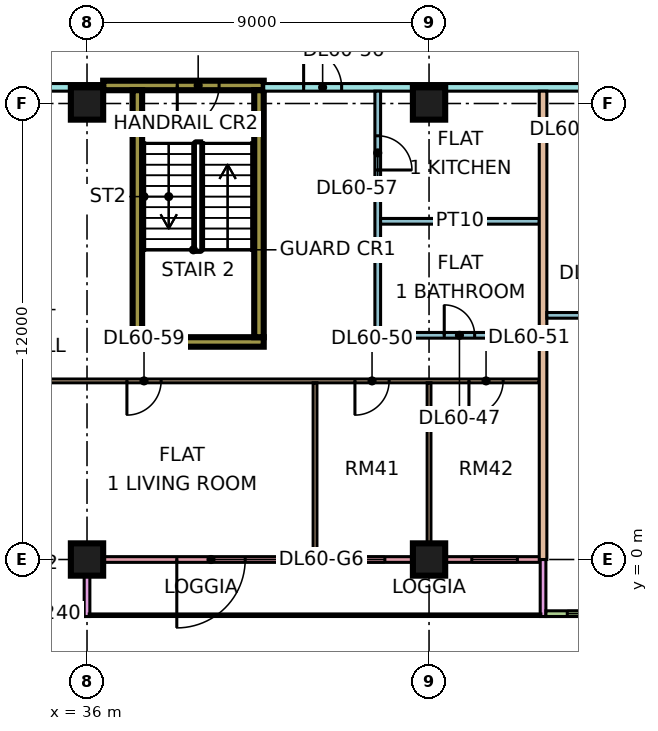
"""IFC4 building model, lengths in metres.
Left out: names, types, materials, properties, quantities, classifications, styles, units other than length and angle.
Written with IfcOpenShell. Run it as: python <this file> out.ifc"""

import sys

from ifc_helpers import new_model, si_unit, direction, frame, frame_2d, origin, origin_2d, place, context, subcontext, project, spatial, rectangle, extrude, element, fill, save


model = new_model("IFC4")
c1 = context("Model", 3, precision=1e-05, world=origin(), true_north=direction((0.0, 1.0)))
c2 = subcontext(c1, "Body", "Model", "MODEL_VIEW")
j1 = project(units=[si_unit("LENGTHUNIT", "METRE"), si_unit("PLANEANGLEUNIT", "RADIAN")], contexts=[c1])
p1 = place(None, origin())
s1 = spatial("IfcSite", under=j1, at=p1, CompositionType="ELEMENT")
p2 = place(p1, origin())
s2 = spatial("IfcBuilding", under=s1, at=p2, CompositionType="ELEMENT")
p3 = place(p2, frame((0.0, 0.0, 252.9)))
s3 = spatial("IfcBuildingStorey", under=s2, at=p3, CompositionType="ELEMENT", Elevation=252.9)
for number, where, z_axis, x_axis in (
    (1, (36.0, 0.0, 0.0), (0.0, 0.0, 1.0), (1.0, 0.0, 0.0)),
    (2, (36.0, 12.0, 0.0), (0.0, 0.0, 1.0), (1.0, 0.0, 0.0)),
    (3, (45.0, 0.0, 0.0), (0.0, 0.0, 1.0), (1.0, 0.0, 0.0)),
    (4, (45.0, 12.0, 0.0), (0.0, 0.0, 1.0), (1.0, 0.0, 0.0)),
):
    element("IfcColumn", number, at=place(p3, frame(where, z_axis=z_axis, x_axis=x_axis)), inside=s3, PredefinedType="COLUMN", context=c2, shape_type="SweptSolid", body=[
        extrude(rectangle(XDim=0.85, YDim=0.85, at=origin_2d()), origin(), (0.0, 0.0, 1.0), 3.75),
    ])
p4 = place(p3, frame((37.2, 5.725, 0.0), z_axis=(0.0, 0.0, 1.0), x_axis=(1.0, 0.0, 0.0)))
e5 = element("IfcWall", 5, at=p4, inside=s3, PredefinedType="SHEAR", context=c2, shape_type="SweptSolid", body=[
    extrude(rectangle(XDim=3.45, YDim=0.25, at=frame_2d((1.725, 0.0))), origin(), (0.0, 0.0, 1.0), 3.75),
])
p5 = place(p3, frame((36.425, 12.475, 0.0), z_axis=(0.0, 0.0, 1.0), x_axis=(1.0, 0.0, 0.0)))
e6 = element("IfcWall", 6, at=p5, inside=s3, PredefinedType="SHEAR", context=c2, shape_type="SweptSolid", body=[
    extrude(rectangle(XDim=4.225, YDim=0.25, at=frame_2d((2.112, 0.0))), origin(), (0.0, 0.0, 1.0), 3.75),
])
p6 = place(p5, frame((1.95, 0.0, 0.0)))
e7 = element("IfcOpeningElement", 7, at=p6, cuts=e6, PredefinedType="OPENING", context=c2, shape_type="SweptSolid", body=[
    extrude(rectangle(XDim=1.1, YDim=2.2, at=frame_2d((0.55, 1.1))), frame((0.0, 0.135, 0.0), z_axis=(0.0, -1.0, 0.0), x_axis=(1.0, 0.0, 0.0)), (0.0, 0.0, 1.0), 0.27),
])
for number, where, z_axis, x_axis in (
    (8, (37.325, 5.85, 0.0), (0.0, 0.0, 1.0), (0.0, 1.0, 0.0)),
    (9, (40.525, 5.85, 0.0), (0.0, 0.0, 1.0), (0.0, 1.0, 0.0)),
):
    element("IfcWall", number, at=place(p3, frame(where, z_axis=z_axis, x_axis=x_axis)), inside=s3, PredefinedType="SHEAR", context=c2, shape_type="SweptSolid", body=[
        extrude(rectangle(XDim=6.5, YDim=0.25, at=frame_2d((3.25, 0.0))), origin(), (0.0, 0.0, 1.0), 3.75),
    ])
p7 = place(p3, frame((24.075, -1.425, 0.0), z_axis=(0.0, 0.0, 1.0), x_axis=(1.0, 0.0, 0.0)))
e10 = element("IfcWall", 10, at=p7, inside=s3, PredefinedType="SOLIDWALL", context=c2, shape_type="SweptSolid", body=[
    extrude(rectangle(XDim=11.85, YDim=0.15, at=frame_2d((5.925, 0.0))), origin(), (0.0, 0.0, 1.0), 3.3),
])
p8 = place(p7, frame((1.462, 0.0, 0.45)))
e11 = element("IfcOpeningElement", 11, at=p8, cuts=e10, PredefinedType="OPENING", context=c2, shape_type="SweptSolid", body=[
    extrude(rectangle(XDim=3.0, YDim=2.4, at=frame_2d((1.5, 1.2))), frame((0.0, 0.085, 0.0), z_axis=(0.0, -1.0, 0.0), x_axis=(1.0, 0.0, 0.0)), (0.0, 0.0, 1.0), 0.17),
])
p9 = place(p7, frame((6.525, 0.0, 0.45)))
e12 = element("IfcOpeningElement", 12, at=p9, cuts=e10, PredefinedType="OPENING", context=c2, shape_type="SweptSolid", body=[
    extrude(rectangle(XDim=1.8, YDim=2.4, at=frame_2d((0.9, 1.2))), frame((0.0, 0.085, 0.0), z_axis=(0.0, -1.0, 0.0), x_axis=(1.0, 0.0, 0.0)), (0.0, 0.0, 1.0), 0.17),
])
p10 = place(p7, frame((9.488, 0.0, 0.45)))
e13 = element("IfcOpeningElement", 13, at=p10, cuts=e10, PredefinedType="OPENING", context=c2, shape_type="SweptSolid", body=[
    extrude(rectangle(XDim=1.8, YDim=2.4, at=frame_2d((0.9, 1.2))), frame((0.0, 0.085, 0.0), z_axis=(0.0, -1.0, 0.0), x_axis=(1.0, 0.0, 0.0)), (0.0, 0.0, 1.0), 0.17),
])
p11 = place(p3, frame((36.075, 0.0, 0.0), z_axis=(0.0, 0.0, 1.0), x_axis=(1.0, 0.0, 0.0)))
e14 = element("IfcWall", 14, at=p11, inside=s3, PredefinedType="SOLIDWALL", context=c2, shape_type="SweptSolid", body=[
    extrude(rectangle(XDim=11.85, YDim=0.15, at=frame_2d((5.925, 0.0))), origin(), (0.0, 0.0, 1.0), 3.3),
])
p12 = place(p11, frame((2.288, 0.0, 0.0)))
e15 = element("IfcOpeningElement", 15, at=p12, cuts=e14, PredefinedType="OPENING", context=c2, shape_type="SweptSolid", body=[
    extrude(rectangle(XDim=1.8, YDim=2.4, at=frame_2d((0.9, 1.2))), frame((0.0, 0.085, 0.0), z_axis=(0.0, -1.0, 0.0), x_axis=(1.0, 0.0, 0.0)), (0.0, 0.0, 1.0), 0.17),
])
p13 = place(p11, frame((6.562, 0.0, 0.45)))
e16 = element("IfcOpeningElement", 16, at=p13, cuts=e14, PredefinedType="OPENING", context=c2, shape_type="SweptSolid", body=[
    extrude(rectangle(XDim=1.2, YDim=2.4, at=frame_2d((0.6, 1.2))), frame((0.0, 0.085, 0.0), z_axis=(0.0, -1.0, 0.0), x_axis=(1.0, 0.0, 0.0)), (0.0, 0.0, 1.0), 0.17),
])
p14 = place(p11, frame((10.05, 0.0, 0.45)))
e17 = element("IfcOpeningElement", 17, at=p14, cuts=e14, PredefinedType="OPENING", context=c2, shape_type="SweptSolid", body=[
    extrude(rectangle(XDim=1.2, YDim=2.4, at=frame_2d((0.6, 1.2))), frame((0.0, 0.085, 0.0), z_axis=(0.0, -1.0, 0.0), x_axis=(1.0, 0.0, 0.0)), (0.0, 0.0, 1.0), 0.17),
])
for number, where, z_axis, x_axis in (
    (18, (36.0, -1.5, 0.0), (0.0, 0.0, 1.0), (0.0, 1.0, 0.0)),
    (19, (48.0, -1.5, 0.0), (0.0, 0.0, 1.0), (0.0, 1.0, 0.0)),
):
    element("IfcWall", number, at=place(p3, frame(where, z_axis=z_axis, x_axis=x_axis)), inside=s3, PredefinedType="SOLIDWALL", context=c2, shape_type="SweptSolid", body=[
        extrude(rectangle(XDim=1.5, YDim=0.15, at=frame_2d((0.75, 0.0))), origin(), (0.0, 0.0, 1.0), 3.3),
    ])
p15 = place(p3, frame((48.075, -1.425, 0.0), z_axis=(0.0, 0.0, 1.0), x_axis=(1.0, 0.0, 0.0)))
e20 = element("IfcWall", 20, at=p15, inside=s3, PredefinedType="SOLIDWALL", context=c2, shape_type="SweptSolid", body=[
    extrude(rectangle(XDim=13.425, YDim=0.15, at=frame_2d((6.712, 0.0))), origin(), (0.0, 0.0, 1.0), 3.3),
])
p16 = place(p15, frame((0.562, 0.0, 0.45)))
e21 = element("IfcOpeningElement", 21, at=p16, cuts=e20, PredefinedType="OPENING", context=c2, shape_type="SweptSolid", body=[
    extrude(rectangle(XDim=1.8, YDim=2.4, at=frame_2d((0.9, 1.2))), frame((0.0, 0.085, 0.0), z_axis=(0.0, -1.0, 0.0), x_axis=(1.0, 0.0, 0.0)), (0.0, 0.0, 1.0), 0.17),
])
p17 = place(p15, frame((4.425, 0.0, 0.45)))
e22 = element("IfcOpeningElement", 22, at=p17, cuts=e20, PredefinedType="OPENING", context=c2, shape_type="SweptSolid", body=[
    extrude(rectangle(XDim=3.0, YDim=2.4, at=frame_2d((1.5, 1.2))), frame((0.0, 0.085, 0.0), z_axis=(0.0, -1.0, 0.0), x_axis=(1.0, 0.0, 0.0)), (0.0, 0.0, 1.0), 0.17),
])
p18 = place(p15, frame((9.375, 0.0, 0.45)))
e23 = element("IfcOpeningElement", 23, at=p18, cuts=e20, PredefinedType="OPENING", context=c2, shape_type="SweptSolid", body=[
    extrude(rectangle(XDim=3.6, YDim=2.4, at=frame_2d((1.8, 1.2))), frame((0.0, 0.085, 0.0), z_axis=(0.0, -1.0, 0.0), x_axis=(1.0, 0.0, 0.0)), (0.0, 0.0, 1.0), 0.17),
])
p19 = place(p3, frame((33.05, 4.7, 0.0), z_axis=(0.0, 0.0, 1.0), x_axis=(1.0, 0.0, 0.0)))
e24 = element("IfcWall", 24, at=p19, inside=s3, PredefinedType="PARTITIONING", context=c2, shape_type="SweptSolid", body=[
    extrude(rectangle(XDim=14.85, YDim=0.1, at=frame_2d((7.425, 0.0))), origin(), (0.0, 0.0, 1.0), 3.3),
])
p20 = place(p19, frame((10.0, 0.0, 0.0)))
e25 = element("IfcOpeningElement", 25, at=p20, cuts=e24, PredefinedType="OPENING", context=c2, shape_type="SweptSolid", body=[
    extrude(rectangle(XDim=0.9, YDim=2.1, at=frame_2d((0.45, 1.05))), frame((0.0, 0.06, 0.0), z_axis=(0.0, -1.0, 0.0), x_axis=(1.0, 0.0, 0.0)), (0.0, 0.0, 1.0), 0.12),
])
p21 = place(p19, frame((13.0, 0.0, 0.0)))
e26 = element("IfcOpeningElement", 26, at=p21, cuts=e24, PredefinedType="OPENING", context=c2, shape_type="SweptSolid", body=[
    extrude(rectangle(XDim=0.9, YDim=2.1, at=frame_2d((0.45, 1.05))), frame((0.0, 0.06, 0.0), z_axis=(0.0, -1.0, 0.0), x_axis=(1.0, 0.0, 0.0)), (0.0, 0.0, 1.0), 0.12),
])
p22 = place(p19, frame((4.0, 0.0, 0.0)))
e27 = element("IfcOpeningElement", 27, at=p22, cuts=e24, PredefinedType="OPENING", context=c2, shape_type="SweptSolid", body=[
    extrude(rectangle(XDim=0.9, YDim=2.1, at=frame_2d((0.45, 1.05))), frame((0.0, 0.06, 0.0), z_axis=(0.0, -1.0, 0.0), x_axis=(1.0, 0.0, 0.0)), (0.0, 0.0, 1.0), 0.12),
])
p23 = place(p3, frame((34.0, 12.425, 0.0), z_axis=(0.0, 0.0, 1.0), x_axis=(1.0, 0.0, 0.0)))
e28 = element("IfcWall", 28, at=p23, inside=s3, PredefinedType="PARTITIONING", context=c2, shape_type="SweptSolid", body=[
    extrude(rectangle(XDim=2.426, YDim=0.2, at=frame_2d((1.213, 0.0))), origin(), (0.0, 0.0, 1.0), 3.3),
])
p24 = place(p3, frame((40.65, 12.425, 0.0), z_axis=(0.0, 0.0, 1.0), x_axis=(1.0, 0.0, 0.0)))
e29 = element("IfcWall", 29, at=p24, inside=s3, PredefinedType="PARTITIONING", context=c2, shape_type="SweptSolid", body=[
    extrude(rectangle(XDim=22.276, YDim=0.2, at=frame_2d((11.138, 0.0))), origin(), (0.0, 0.0, 1.0), 3.3),
])
p25 = place(p24, frame((8.7, 0.0, 0.0)))
e30 = element("IfcOpeningElement", 30, at=p25, cuts=e29, PredefinedType="OPENING", context=c2, shape_type="SweptSolid", body=[
    extrude(rectangle(XDim=1.0, YDim=2.1, at=frame_2d((0.5, 1.05))), frame((0.0, 0.11, 0.0), z_axis=(0.0, -1.0, 0.0), x_axis=(1.0, 0.0, 0.0)), (0.0, 0.0, 1.0), 0.22),
])
p26 = place(p24, frame((1.05, 0.0, 0.0)))
e31 = element("IfcOpeningElement", 31, at=p26, cuts=e29, PredefinedType="OPENING", context=c2, shape_type="SweptSolid", body=[
    extrude(rectangle(XDim=1.0, YDim=2.1, at=frame_2d((0.5, 1.05))), frame((0.0, 0.11, 0.0), z_axis=(0.0, -1.0, 0.0), x_axis=(1.0, 0.0, 0.0)), (0.0, 0.0, 1.0), 0.22),
])
p27 = place(p3, frame((42.0, 0.074, 0.0), z_axis=(0.0, 0.0, 1.0), x_axis=(0.0, 1.0, 0.0)))
e32 = element("IfcWall", 32, at=p27, inside=s3, PredefinedType="PARTITIONING", context=c2, shape_type="SweptSolid", body=[
    extrude(rectangle(XDim=4.576, YDim=0.1, at=frame_2d((2.288, 0.0))), origin(), (0.0, 0.0, 1.0), 3.3),
])
p28 = place(p3, frame((43.65, 5.825, 0.0), z_axis=(0.0, 0.0, 1.0), x_axis=(0.0, 1.0, 0.0)))
e33 = element("IfcWall", 33, at=p28, inside=s3, PredefinedType="PARTITIONING", context=c2, shape_type="SweptSolid", body=[
    extrude(rectangle(XDim=6.5, YDim=0.15, at=frame_2d((3.25, 0.0))), origin(), (0.0, 0.0, 1.0), 3.3),
])
p29 = place(p28, frame((4.425, 0.0, 0.0)))
e34 = element("IfcOpeningElement", 34, at=p29, cuts=e33, PredefinedType="OPENING", context=c2, shape_type="SweptSolid", body=[
    extrude(rectangle(XDim=0.9, YDim=2.1, at=frame_2d((0.45, 1.05))), frame((0.0, 0.085, 0.0), z_axis=(0.0, -1.0, 0.0), x_axis=(1.0, 0.0, 0.0)), (0.0, 0.0, 1.0), 0.17),
])
p30 = place(p3, frame((43.725, 5.9, 0.0), z_axis=(0.0, 0.0, 1.0), x_axis=(1.0, 0.0, 0.0)))
e35 = element("IfcWall", 35, at=p30, inside=s3, PredefinedType="PARTITIONING", context=c2, shape_type="SweptSolid", body=[
    extrude(rectangle(XDim=4.175, YDim=0.15, at=frame_2d((2.087, 0.0))), origin(), (0.0, 0.0, 1.0), 3.3),
])
p31 = place(p30, frame((1.675, 0.0, 0.0)))
e36 = element("IfcOpeningElement", 36, at=p31, cuts=e35, PredefinedType="OPENING", context=c2, shape_type="SweptSolid", body=[
    extrude(rectangle(XDim=0.8, YDim=2.1, at=frame_2d((0.4, 1.05))), frame((0.0, 0.085, 0.0), z_axis=(0.0, -1.0, 0.0), x_axis=(1.0, 0.0, 0.0)), (0.0, 0.0, 1.0), 0.17),
])
p32 = place(p3, frame((43.725, 8.9, 0.0), z_axis=(0.0, 0.0, 1.0), x_axis=(1.0, 0.0, 0.0)))
e37 = element("IfcWall", 37, at=p32, inside=s3, PredefinedType="PARTITIONING", context=c2, shape_type="SweptSolid", body=[
    extrude(rectangle(XDim=4.175, YDim=0.15, at=frame_2d((2.087, 0.0))), origin(), (0.0, 0.0, 1.0), 3.3),
])
p33 = place(p3, frame((45.0, 0.074, 0.0), z_axis=(0.0, 0.0, 1.0), x_axis=(0.0, 1.0, 0.0)))
e38 = element("IfcWall", 38, at=p33, inside=s3, PredefinedType="PARTITIONING", context=c2, shape_type="SweptSolid", body=[
    extrude(rectangle(XDim=4.576, YDim=0.1, at=frame_2d((2.288, 0.0))), origin(), (0.0, 0.0, 1.0), 3.3),
])
p34 = place(p3, frame((48.0, 0.0, 0.0), z_axis=(0.0, 0.0, 1.0), x_axis=(0.0, 1.0, 0.0)))
e39 = element("IfcWall", 39, at=p34, inside=s3, PredefinedType="PARTITIONING", context=c2, shape_type="SweptSolid", body=[
    extrude(rectangle(XDim=12.325, YDim=0.2, at=frame_2d((6.163, 0.0))), origin(), (0.0, 0.0, 1.0), 3.3),
])
p35 = place(p3, frame((48.1, 6.425, 0.0), z_axis=(0.0, 0.0, 1.0), x_axis=(1.0, 0.0, 0.0)))
e40 = element("IfcWall", 40, at=p35, inside=s3, PredefinedType="PARTITIONING", context=c2, shape_type="SweptSolid", body=[
    extrude(rectangle(XDim=8.95, YDim=0.15, at=frame_2d((4.475, 0.0))), origin(), (0.0, 0.0, 1.0), 3.3),
])
p36 = place(p35, frame((0.95, 0.0, 0.0)))
e41 = element("IfcOpeningElement", 41, at=p36, cuts=e40, PredefinedType="OPENING", context=c2, shape_type="SweptSolid", body=[
    extrude(rectangle(XDim=0.9, YDim=2.1, at=frame_2d((0.45, 1.05))), frame((0.0, 0.085, 0.0), z_axis=(0.0, -1.0, 0.0), x_axis=(1.0, 0.0, 0.0)), (0.0, 0.0, 1.0), 0.17),
])
p37 = place(p35, frame((6.95, 0.0, 0.0)))
e42 = element("IfcOpeningElement", 42, at=p37, cuts=e40, PredefinedType="OPENING", context=c2, shape_type="SweptSolid", body=[
    extrude(rectangle(XDim=0.9, YDim=2.1, at=frame_2d((0.45, 1.05))), frame((0.0, 0.085, 0.0), z_axis=(0.0, -1.0, 0.0), x_axis=(1.0, 0.0, 0.0)), (0.0, 0.0, 1.0), 0.17),
])
p38 = place(p10, origin())
e43 = element("IfcWindow", 43, at=p38, inside=s3, PartitioningType="SINGLE_PANEL", PredefinedType="WINDOW", context=c2, shape_type="SweptSolid", body=[
    extrude(rectangle(XDim=1.8, YDim=2.4, at=frame_2d((0.9, 1.2))), frame((0.0, 0.03, 0.0), z_axis=(0.0, -1.0, 0.0), x_axis=(1.0, 0.0, 0.0)), (0.0, 0.0, 1.0), 0.06),
])
fill(e13, e43)
p39 = place(p12, frame((1.8, 0.0, 0.0), z_axis=(0.0, 0.0, 1.0), x_axis=(-1.0, 0.0, 0.0)))
e44 = element("IfcDoor", 44, at=p39, inside=s3, OperationType="DOUBLE_DOOR_SINGLE_SWING", PredefinedType="DOOR", context=c2, shape_type="SweptSolid", body=[
    extrude(rectangle(XDim=1.8, YDim=2.4, at=frame_2d((0.9, 1.2))), frame((0.0, 0.025, 0.0), z_axis=(0.0, -1.0, 0.0), x_axis=(1.0, 0.0, 0.0)), (0.0, 0.0, 1.0), 0.05),
])
fill(e15, e44)
p40 = place(p13, origin())
e45 = element("IfcWindow", 45, at=p40, inside=s3, PartitioningType="SINGLE_PANEL", PredefinedType="WINDOW", context=c2, shape_type="SweptSolid", body=[
    extrude(rectangle(XDim=1.2, YDim=2.4, at=frame_2d((0.6, 1.2))), frame((0.0, 0.03, 0.0), z_axis=(0.0, -1.0, 0.0), x_axis=(1.0, 0.0, 0.0)), (0.0, 0.0, 1.0), 0.06),
])
fill(e16, e45)
p41 = place(p14, origin())
e46 = element("IfcWindow", 46, at=p41, inside=s3, PartitioningType="SINGLE_PANEL", PredefinedType="WINDOW", context=c2, shape_type="SweptSolid", body=[
    extrude(rectangle(XDim=1.2, YDim=2.4, at=frame_2d((0.6, 1.2))), frame((0.0, 0.03, 0.0), z_axis=(0.0, -1.0, 0.0), x_axis=(1.0, 0.0, 0.0)), (0.0, 0.0, 1.0), 0.06),
])
fill(e17, e46)
p42 = place(p16, origin())
e47 = element("IfcWindow", 47, at=p42, inside=s3, PartitioningType="SINGLE_PANEL", PredefinedType="WINDOW", context=c2, shape_type="SweptSolid", body=[
    extrude(rectangle(XDim=1.8, YDim=2.4, at=frame_2d((0.9, 1.2))), frame((0.0, 0.03, 0.0), z_axis=(0.0, -1.0, 0.0), x_axis=(1.0, 0.0, 0.0)), (0.0, 0.0, 1.0), 0.06),
])
fill(e21, e47)
p43 = place(p6, frame((1.1, 0.0, 0.0), z_axis=(0.0, 0.0, 1.0), x_axis=(-1.0, 0.0, 0.0)))
e48 = element("IfcDoor", 48, at=p43, inside=s3, OperationType="SINGLE_SWING_LEFT", PredefinedType="DOOR", context=c2, shape_type="SweptSolid", body=[
    extrude(rectangle(XDim=1.1, YDim=2.2, at=frame_2d((0.55, 1.1))), frame((0.0, 0.025, 0.0), z_axis=(0.0, -1.0, 0.0), x_axis=(1.0, 0.0, 0.0)), (0.0, 0.0, 1.0), 0.05),
])
fill(e7, e48)
p44 = place(p31, origin())
e49 = element("IfcDoor", 49, at=p44, inside=s3, OperationType="SINGLE_SWING_LEFT", PredefinedType="DOOR", context=c2, shape_type="SweptSolid", body=[
    extrude(rectangle(XDim=0.8, YDim=2.1, at=frame_2d((0.4, 1.05))), frame((0.0, 0.025, 0.0), z_axis=(0.0, -1.0, 0.0), x_axis=(1.0, 0.0, 0.0)), (0.0, 0.0, 1.0), 0.05),
])
fill(e36, e49)
p45 = place(p20, frame((0.9, 0.0, 0.0), z_axis=(0.0, 0.0, 1.0), x_axis=(-1.0, 0.0, 0.0)))
e50 = element("IfcDoor", 50, at=p45, inside=s3, OperationType="SINGLE_SWING_LEFT", PredefinedType="DOOR", context=c2, shape_type="SweptSolid", body=[
    extrude(rectangle(XDim=0.9, YDim=2.1, at=frame_2d((0.45, 1.05))), frame((0.0, 0.025, 0.0), z_axis=(0.0, -1.0, 0.0), x_axis=(1.0, 0.0, 0.0)), (0.0, 0.0, 1.0), 0.05),
])
fill(e25, e50)
p46 = place(p21, frame((0.9, 0.0, 0.0), z_axis=(0.0, 0.0, 1.0), x_axis=(-1.0, 0.0, 0.0)))
e51 = element("IfcDoor", 51, at=p46, inside=s3, OperationType="SINGLE_SWING_LEFT", PredefinedType="DOOR", context=c2, shape_type="SweptSolid", body=[
    extrude(rectangle(XDim=0.9, YDim=2.1, at=frame_2d((0.45, 1.05))), frame((0.0, 0.025, 0.0), z_axis=(0.0, -1.0, 0.0), x_axis=(1.0, 0.0, 0.0)), (0.0, 0.0, 1.0), 0.05),
])
fill(e26, e51)
p47 = place(p26, origin())
e52 = element("IfcDoor", 52, at=p47, inside=s3, OperationType="SINGLE_SWING_LEFT", PredefinedType="DOOR", context=c2, shape_type="SweptSolid", body=[
    extrude(rectangle(XDim=1.0, YDim=2.1, at=frame_2d((0.5, 1.05))), frame((0.0, 0.025, 0.0), z_axis=(0.0, -1.0, 0.0), x_axis=(1.0, 0.0, 0.0)), (0.0, 0.0, 1.0), 0.05),
])
fill(e31, e52)
p48 = place(p29, frame((0.9, 0.0, 0.0), z_axis=(0.0, 0.0, 1.0), x_axis=(-1.0, 0.0, 0.0)))
e53 = element("IfcDoor", 53, at=p48, inside=s3, OperationType="SINGLE_SWING_LEFT", PredefinedType="DOOR", context=c2, shape_type="SweptSolid", body=[
    extrude(rectangle(XDim=0.9, YDim=2.1, at=frame_2d((0.45, 1.05))), frame((0.0, 0.025, 0.0), z_axis=(0.0, -1.0, 0.0), x_axis=(1.0, 0.0, 0.0)), (0.0, 0.0, 1.0), 0.05),
])
fill(e34, e53)
p49 = place(p22, frame((0.9, 0.0, 0.0), z_axis=(0.0, 0.0, 1.0), x_axis=(-1.0, 0.0, 0.0)))
e54 = element("IfcDoor", 54, at=p49, inside=s3, OperationType="SINGLE_SWING_LEFT", PredefinedType="DOOR", context=c2, shape_type="SweptSolid", body=[
    extrude(rectangle(XDim=0.9, YDim=2.1, at=frame_2d((0.45, 1.05))), frame((0.0, 0.025, 0.0), z_axis=(0.0, -1.0, 0.0), x_axis=(1.0, 0.0, 0.0)), (0.0, 0.0, 1.0), 0.05),
])
fill(e27, e54)
save(model, sys.argv[1])
